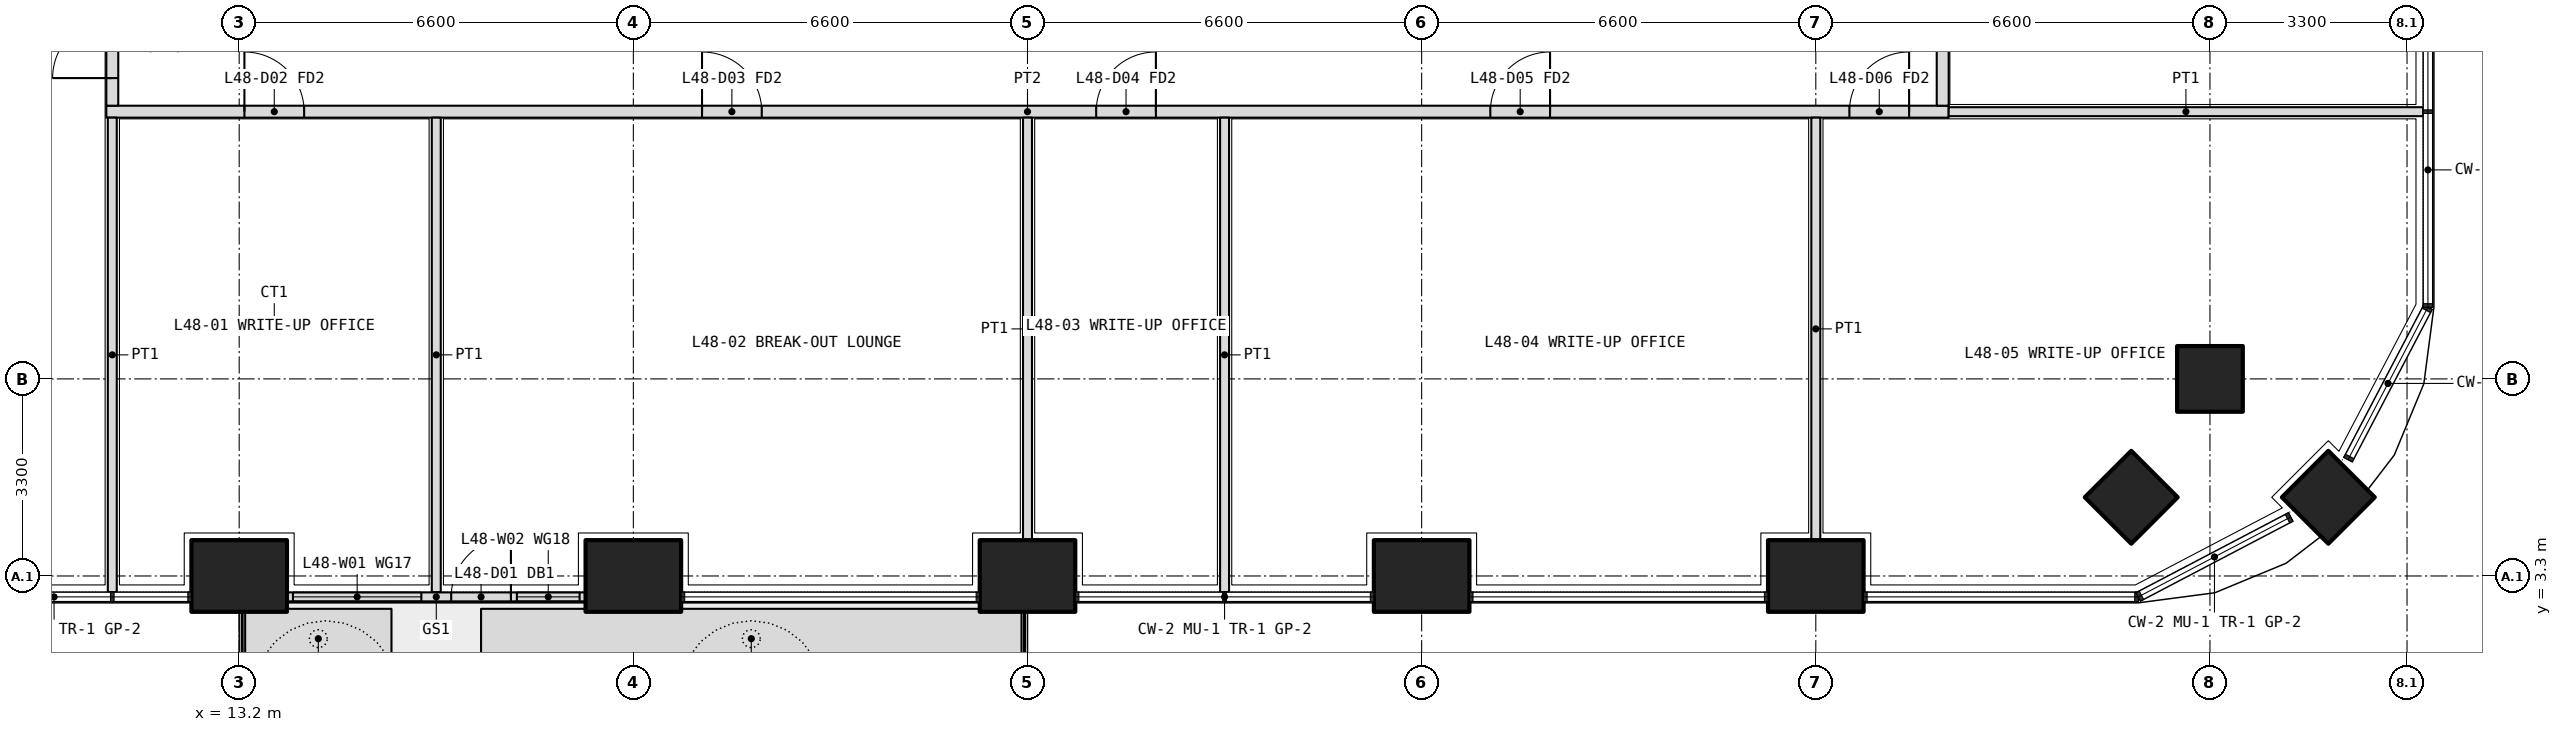
"""IFC4 building model, lengths in metres.
Left out: names, types, materials, properties, quantities, classifications, styles, units other than length and angle.
Written with IfcOpenShell. Run it as: python <this file> out.ifc"""

import sys

from ifc_helpers import new_model, si_unit, direction, frame, frame_2d, origin, origin_2d, place, context, subcontext, project, spatial, polyline, rectangle, outline, extrude, element, fill, save


model = new_model("IFC4")
c1 = context("Model", 3, precision=1e-05, world=origin(), true_north=direction((0.0, 1.0)))
c2 = subcontext(c1, "Body", "Model", "MODEL_VIEW")
j1 = project(units=[si_unit("LENGTHUNIT", "METRE"), si_unit("PLANEANGLEUNIT", "RADIAN")], contexts=[c1])
p1 = place(None, origin())
s1 = spatial("IfcSite", under=j1, at=p1, CompositionType="ELEMENT")
p2 = place(p1, origin())
s2 = spatial("IfcBuilding", under=s1, at=p2, CompositionType="ELEMENT")
p3 = place(p2, frame((0.0, 0.0, 210.3)))
s3 = spatial("IfcBuildingStorey", under=s2, at=p3, CompositionType="ELEMENT", Elevation=210.3)
p4 = place(p3, frame((48.182, 4.618, 0.0), z_axis=(0.0, 0.0, 1.0), x_axis=(0.707106781187, 0.707106781187, 0.0)))
e1 = element("IfcColumn", 1, at=p4, inside=s3, PredefinedType="COLUMN", context=c2, shape_type="SweptSolid", body=[
    extrude(rectangle(XDim=1.1, YDim=1.1, at=origin_2d()), origin(), (0.0, 0.0, 1.0), 4.2),
])
for number, where, z_axis, x_axis in (
    (2, (13.2, 3.3, 0.0), (0.0, 0.0, 1.0), (1.0, 0.0, 0.0)),
    (3, (19.8, 3.3, 0.0), (0.0, 0.0, 1.0), (1.0, 0.0, 0.0)),
    (4, (26.4, 3.3, 0.0), (0.0, 0.0, 1.0), (1.0, 0.0, 0.0)),
    (5, (33.0, 3.3, 0.0), (0.0, 0.0, 1.0), (1.0, 0.0, 0.0)),
    (6, (39.6, 3.3, 0.0), (0.0, 0.0, 1.0), (1.0, 0.0, 0.0)),
):
    element("IfcColumn", number, at=place(p3, frame(where, z_axis=z_axis, x_axis=x_axis)), inside=s3, PredefinedType="COLUMN", context=c2, shape_type="SweptSolid", body=[
        extrude(rectangle(XDim=1.6, YDim=1.2, at=origin_2d()), origin(), (0.0, 0.0, 1.0), 4.2),
    ])
for number, where, z_axis, x_axis in (
    (7, (46.2, 6.6, 0.0), (0.0, 0.0, 1.0), (1.0, 0.0, 0.0)),
    (8, (44.882, 4.618, 0.0), (0.0, 0.0, 1.0), (0.707, 0.707, 0.0)),
):
    element("IfcColumn", number, at=place(p3, frame(where, z_axis=z_axis, x_axis=x_axis)), inside=s3, PredefinedType="COLUMN", context=c2, shape_type="SweptSolid", body=[
        extrude(rectangle(XDim=1.1, YDim=1.1, at=origin_2d()), origin(), (0.0, 0.0, 1.0), 4.2),
    ])
p5 = place(p3, origin())
e9 = element("IfcWall", 9, at=p5, inside=s3, PredefinedType="USERDEFINED", context=c2, shape_type="SweptSolid", body=[
    extrude(outline(polyline([(13.3, 1.75), (15.75, 1.75), (15.75, 2.75), (13.3, 2.75), (13.3, 1.75)]), holes=[polyline([(13.45, 1.9), (15.6, 1.9), (15.6, 2.6), (13.45, 2.6), (13.45, 1.9)])]), origin(), (0.0, 0.0, 1.0), 1.05),
])
p6 = place(p3, origin())
e10 = element("IfcWall", 10, at=p6, inside=s3, PredefinedType="USERDEFINED", context=c2, shape_type="SweptSolid", body=[
    extrude(outline(polyline([(17.25, 1.75), (26.3, 1.75), (26.3, 2.75), (17.25, 2.75), (17.25, 1.75)]), holes=[polyline([(17.4, 1.9), (26.15, 1.9), (26.15, 2.6), (17.4, 2.6), (17.4, 1.9)])]), origin(), (0.0, 0.0, 1.0), 1.05),
])
p7 = place(p3, frame((14.0, 2.95, 0.0), z_axis=(0.0, 0.0, 1.0), x_axis=(1.0, 0.0, 0.0)))
e11 = element("IfcWall", 11, at=p7, inside=s3, PredefinedType="SOLIDWALL", context=c2, shape_type="SweptSolid", body=[
    extrude(rectangle(XDim=5.0, YDim=0.15, at=frame_2d((2.5, 0.0))), origin(), (0.0, 0.0, 1.0), 2.6),
])
p8 = place(p7, frame((2.75, 0.0, 0.0)))
e12 = element("IfcOpeningElement", 12, at=p8, cuts=e11, PredefinedType="OPENING", context=c2, shape_type="SweptSolid", body=[
    extrude(rectangle(XDim=1.0, YDim=2.4, at=frame_2d((0.5, 1.2))), frame((0.0, 0.085, 0.0), z_axis=(0.0, -1.0, 0.0), x_axis=(1.0, 0.0, 0.0)), (0.0, 0.0, 1.0), 0.17),
])
p9 = place(p7, frame((0.1, 0.0, 0.1)))
e13 = element("IfcOpeningElement", 13, at=p9, cuts=e11, PredefinedType="OPENING", context=c2, shape_type="SweptSolid", body=[
    extrude(rectangle(XDim=2.15, YDim=2.2, at=frame_2d((1.075, 1.1))), frame((0.0, 0.085, 0.0), z_axis=(0.0, -1.0, 0.0), x_axis=(1.0, 0.0, 0.0)), (0.0, 0.0, 1.0), 0.17),
])
p10 = place(p7, frame((3.85, 0.0, 0.1)))
e14 = element("IfcOpeningElement", 14, at=p10, cuts=e11, PredefinedType="OPENING", context=c2, shape_type="SweptSolid", body=[
    extrude(rectangle(XDim=1.05, YDim=2.2, at=frame_2d((0.525, 1.1))), frame((0.0, 0.085, 0.0), z_axis=(0.0, -1.0, 0.0), x_axis=(1.0, 0.0, 0.0)), (0.0, 0.0, 1.0), 0.17),
])
p11 = place(p3, frame((10.975, 11.075, 0.0), z_axis=(0.0, 0.0, 1.0), x_axis=(1.0, 0.0, 0.0)))
e15 = element("IfcWall", 15, at=p11, inside=s3, PredefinedType="PARTITIONING", context=c2, shape_type="SweptSolid", body=[
    extrude(rectangle(XDim=30.85, YDim=0.2, at=frame_2d((15.425, 0.0))), origin(), (0.0, 0.0, 1.0), 2.85),
])
p12 = place(p11, frame((2.312, 0.0, 0.0)))
e16 = element("IfcOpeningElement", 16, at=p12, cuts=e15, PredefinedType="OPENING", context=c2, shape_type="SweptSolid", body=[
    extrude(rectangle(XDim=1.0, YDim=2.1, at=frame_2d((0.5, 1.05))), frame((0.0, 0.11, 0.0), z_axis=(0.0, -1.0, 0.0), x_axis=(1.0, 0.0, 0.0)), (0.0, 0.0, 1.0), 0.22),
])
p13 = place(p11, frame((9.975, 0.0, 0.0)))
e17 = element("IfcOpeningElement", 17, at=p13, cuts=e15, PredefinedType="OPENING", context=c2, shape_type="SweptSolid", body=[
    extrude(rectangle(XDim=1.0, YDim=2.1, at=frame_2d((0.5, 1.05))), frame((0.0, 0.11, 0.0), z_axis=(0.0, -1.0, 0.0), x_axis=(1.0, 0.0, 0.0)), (0.0, 0.0, 1.0), 0.22),
])
p14 = place(p11, frame((16.575, 0.0, 0.0)))
e18 = element("IfcOpeningElement", 18, at=p14, cuts=e15, PredefinedType="OPENING", context=c2, shape_type="SweptSolid", body=[
    extrude(rectangle(XDim=1.0, YDim=2.1, at=frame_2d((0.5, 1.05))), frame((0.0, 0.11, 0.0), z_axis=(0.0, -1.0, 0.0), x_axis=(1.0, 0.0, 0.0)), (0.0, 0.0, 1.0), 0.22),
])
p15 = place(p11, frame((23.175, 0.0, 0.0)))
e19 = element("IfcOpeningElement", 19, at=p15, cuts=e15, PredefinedType="OPENING", context=c2, shape_type="SweptSolid", body=[
    extrude(rectangle(XDim=1.0, YDim=2.1, at=frame_2d((0.5, 1.05))), frame((0.0, 0.11, 0.0), z_axis=(0.0, -1.0, 0.0), x_axis=(1.0, 0.0, 0.0)), (0.0, 0.0, 1.0), 0.22),
])
p16 = place(p11, frame((29.188, 0.0, 0.0)))
e20 = element("IfcOpeningElement", 20, at=p16, cuts=e15, PredefinedType="OPENING", context=c2, shape_type="SweptSolid", body=[
    extrude(rectangle(XDim=1.0, YDim=2.1, at=frame_2d((0.5, 1.05))), frame((0.0, 0.11, 0.0), z_axis=(0.0, -1.0, 0.0), x_axis=(1.0, 0.0, 0.0)), (0.0, 0.0, 1.0), 0.22),
])
p17 = place(p3, frame((11.075, 11.175, 0.0), z_axis=(0.0, 0.0, 1.0), x_axis=(0.0, 1.0, 0.0)))
e21 = element("IfcWall", 21, at=p17, inside=s3, PredefinedType="PARTITIONING", context=c2, shape_type="SweptSolid", body=[
    extrude(rectangle(XDim=23.85, YDim=0.2, at=frame_2d((11.925, 0.0))), origin(), (0.0, 0.0, 1.0), 2.85),
])
p18 = place(p17, frame((0.462, 0.0, 0.0)))
e22 = element("IfcOpeningElement", 22, at=p18, cuts=e21, PredefinedType="OPENING", context=c2, shape_type="SweptSolid", body=[
    extrude(rectangle(XDim=1.0, YDim=2.1, at=frame_2d((0.5, 1.05))), frame((0.0, 0.11, 0.0), z_axis=(0.0, -1.0, 0.0), x_axis=(1.0, 0.0, 0.0)), (0.0, 0.0, 1.0), 0.22),
])
p19 = place(p17, frame((3.125, 0.0, 0.0)))
e23 = element("IfcOpeningElement", 23, at=p19, cuts=e21, PredefinedType="OPENING", context=c2, shape_type="SweptSolid", body=[
    extrude(rectangle(XDim=1.0, YDim=2.1, at=frame_2d((0.5, 1.05))), frame((0.0, 0.11, 0.0), z_axis=(0.0, -1.0, 0.0), x_axis=(1.0, 0.0, 0.0)), (0.0, 0.0, 1.0), 0.22),
])
p20 = place(p17, frame((6.475, 0.0, 0.0)))
e24 = element("IfcOpeningElement", 24, at=p20, cuts=e21, PredefinedType="OPENING", context=c2, shape_type="SweptSolid", body=[
    extrude(rectangle(XDim=0.9, YDim=2.1, at=frame_2d((0.45, 1.05))), frame((0.0, 0.11, 0.0), z_axis=(0.0, -1.0, 0.0), x_axis=(1.0, 0.0, 0.0)), (0.0, 0.0, 1.0), 0.22),
])
p21 = place(p17, frame((9.675, 0.0, 0.0)))
e25 = element("IfcOpeningElement", 25, at=p21, cuts=e21, PredefinedType="OPENING", context=c2, shape_type="SweptSolid", body=[
    extrude(rectangle(XDim=0.9, YDim=2.1, at=frame_2d((0.45, 1.05))), frame((0.0, 0.11, 0.0), z_axis=(0.0, -1.0, 0.0), x_axis=(1.0, 0.0, 0.0)), (0.0, 0.0, 1.0), 0.22),
])
p22 = place(p17, frame((12.925, 0.0, 0.0)))
e26 = element("IfcOpeningElement", 26, at=p22, cuts=e21, PredefinedType="OPENING", context=c2, shape_type="SweptSolid", body=[
    extrude(rectangle(XDim=1.0, YDim=2.1, at=frame_2d((0.5, 1.05))), frame((0.0, 0.11, 0.0), z_axis=(0.0, -1.0, 0.0), x_axis=(1.0, 0.0, 0.0)), (0.0, 0.0, 1.0), 0.22),
])
p23 = place(p17, frame((16.275, 0.0, 0.0)))
e27 = element("IfcOpeningElement", 27, at=p23, cuts=e21, PredefinedType="OPENING", context=c2, shape_type="SweptSolid", body=[
    extrude(rectangle(XDim=1.2, YDim=2.1, at=frame_2d((0.6, 1.05))), frame((0.0, 0.11, 0.0), z_axis=(0.0, -1.0, 0.0), x_axis=(1.0, 0.0, 0.0)), (0.0, 0.0, 1.0), 0.22),
])
p24 = place(p17, frame((19.575, 0.0, 0.0)))
e28 = element("IfcOpeningElement", 28, at=p24, cuts=e21, PredefinedType="OPENING", context=c2, shape_type="SweptSolid", body=[
    extrude(rectangle(XDim=1.2, YDim=2.1, at=frame_2d((0.6, 1.05))), frame((0.0, 0.11, 0.0), z_axis=(0.0, -1.0, 0.0), x_axis=(1.0, 0.0, 0.0)), (0.0, 0.0, 1.0), 0.22),
])
p25 = place(p17, frame((22.288, 0.0, 0.0)))
e29 = element("IfcOpeningElement", 29, at=p25, cuts=e21, PredefinedType="OPENING", context=c2, shape_type="SweptSolid", body=[
    extrude(rectangle(XDim=1.2, YDim=2.1, at=frame_2d((0.6, 1.05))), frame((0.0, 0.11, 0.0), z_axis=(0.0, -1.0, 0.0), x_axis=(1.0, 0.0, 0.0)), (0.0, 0.0, 1.0), 0.22),
])
p26 = place(p3, frame((41.725, 11.175, 0.0), z_axis=(0.0, 0.0, 1.0), x_axis=(0.0, 1.0, 0.0)))
e30 = element("IfcWall", 30, at=p26, inside=s3, PredefinedType="PARTITIONING", context=c2, shape_type="SweptSolid", body=[
    extrude(rectangle(XDim=23.85, YDim=0.2, at=frame_2d((11.925, 0.0))), origin(), (0.0, 0.0, 1.0), 2.85),
])
p27 = place(p26, frame((3.762, 0.0, 0.0)))
e31 = element("IfcOpeningElement", 31, at=p27, cuts=e30, PredefinedType="OPENING", context=c2, shape_type="SweptSolid", body=[
    extrude(rectangle(XDim=1.0, YDim=2.1, at=frame_2d((0.5, 1.05))), frame((0.0, 0.11, 0.0), z_axis=(0.0, -1.0, 0.0), x_axis=(1.0, 0.0, 0.0)), (0.0, 0.0, 1.0), 0.22),
])
p28 = place(p26, frame((9.625, 0.0, 0.0)))
e32 = element("IfcOpeningElement", 32, at=p28, cuts=e30, PredefinedType="OPENING", context=c2, shape_type="SweptSolid", body=[
    extrude(rectangle(XDim=1.0, YDim=2.1, at=frame_2d((0.5, 1.05))), frame((0.0, 0.11, 0.0), z_axis=(0.0, -1.0, 0.0), x_axis=(1.0, 0.0, 0.0)), (0.0, 0.0, 1.0), 0.22),
])
p29 = place(p26, frame((12.975, 0.0, 0.0)))
e33 = element("IfcOpeningElement", 33, at=p29, cuts=e30, PredefinedType="OPENING", context=c2, shape_type="SweptSolid", body=[
    extrude(rectangle(XDim=0.9, YDim=2.1, at=frame_2d((0.45, 1.05))), frame((0.0, 0.11, 0.0), z_axis=(0.0, -1.0, 0.0), x_axis=(1.0, 0.0, 0.0)), (0.0, 0.0, 1.0), 0.22),
])
p30 = place(p26, frame((17.925, 0.0, 0.0)))
e34 = element("IfcOpeningElement", 34, at=p30, cuts=e30, PredefinedType="OPENING", context=c2, shape_type="SweptSolid", body=[
    extrude(rectangle(XDim=1.2, YDim=2.1, at=frame_2d((0.6, 1.05))), frame((0.0, 0.11, 0.0), z_axis=(0.0, -1.0, 0.0), x_axis=(1.0, 0.0, 0.0)), (0.0, 0.0, 1.0), 0.22),
])
p31 = place(p26, frame((22.387, 0.0, 0.0)))
e35 = element("IfcOpeningElement", 35, at=p31, cuts=e30, PredefinedType="OPENING", context=c2, shape_type="SweptSolid", body=[
    extrude(rectangle(XDim=1.0, YDim=2.1, at=frame_2d((0.5, 1.05))), frame((0.0, 0.11, 0.0), z_axis=(0.0, -1.0, 0.0), x_axis=(1.0, 0.0, 0.0)), (0.0, 0.0, 1.0), 0.22),
])
for number, where, z_axis, x_axis in (
    (36, (11.075, 3.03, 0.0), (0.0, 0.0, 1.0), (0.0, 1.0, 0.0)),
    (37, (49.77, 11.075, 0.0), (0.0, 0.0, 1.0), (-1.0, 0.0, 0.0)),
    (38, (16.5, 3.03, 0.0), (0.0, 0.0, 1.0), (0.0, 1.0, 0.0)),
):
    element("IfcWall", number, at=place(p3, frame(where, z_axis=z_axis, x_axis=x_axis)), inside=s3, PredefinedType="PARTITIONING", context=c2, shape_type="SweptSolid", body=[
        extrude(rectangle(XDim=7.945, YDim=0.15, at=frame_2d((3.973, 0.0))), origin(), (0.0, 0.0, 1.0), 2.6),
    ])
p32 = place(p3, frame((26.4, 3.9, 0.0), z_axis=(0.0, 0.0, 1.0), x_axis=(0.0, 1.0, 0.0)))
e39 = element("IfcWall", 39, at=p32, inside=s3, PredefinedType="PARTITIONING", context=c2, shape_type="SweptSolid", body=[
    extrude(rectangle(XDim=7.075, YDim=0.15, at=frame_2d((3.538, 0.0))), origin(), (0.0, 0.0, 1.0), 2.85),
])
p33 = place(p3, frame((29.7, 3.03, 0.0), z_axis=(0.0, 0.0, 1.0), x_axis=(0.0, 1.0, 0.0)))
e40 = element("IfcWall", 40, at=p33, inside=s3, PredefinedType="PARTITIONING", context=c2, shape_type="SweptSolid", body=[
    extrude(rectangle(XDim=7.945, YDim=0.15, at=frame_2d((3.973, 0.0))), origin(), (0.0, 0.0, 1.0), 2.6),
])
p34 = place(p3, frame((39.6, 3.9, 0.0), z_axis=(0.0, 0.0, 1.0), x_axis=(0.0, 1.0, 0.0)))
e41 = element("IfcWall", 41, at=p34, inside=s3, PredefinedType="PARTITIONING", context=c2, shape_type="SweptSolid", body=[
    extrude(rectangle(XDim=7.075, YDim=0.15, at=frame_2d((3.538, 0.0))), origin(), (0.0, 0.0, 1.0), 2.85),
])
p35 = place(p8, origin())
e42 = element("IfcDoor", 42, at=p35, inside=s3, OperationType="SINGLE_SWING_RIGHT", PredefinedType="DOOR", context=c2, shape_type="SweptSolid", body=[
    extrude(rectangle(XDim=1.0, YDim=2.4, at=frame_2d((0.5, 1.2))), frame((0.0, 0.025, 0.0), z_axis=(0.0, -1.0, 0.0), x_axis=(1.0, 0.0, 0.0)), (0.0, 0.0, 1.0), 0.05),
])
fill(e12, e42)
p36 = place(p9, origin())
e43 = element("IfcWindow", 43, at=p36, inside=s3, PartitioningType="SINGLE_PANEL", PredefinedType="WINDOW", context=c2, shape_type="SweptSolid", body=[
    extrude(rectangle(XDim=2.15, YDim=2.2, at=frame_2d((1.075, 1.1))), frame((0.0, 0.03, 0.0), z_axis=(0.0, -1.0, 0.0), x_axis=(1.0, 0.0, 0.0)), (0.0, 0.0, 1.0), 0.06),
])
fill(e13, e43)
p37 = place(p10, origin())
e44 = element("IfcWindow", 44, at=p37, inside=s3, PartitioningType="SINGLE_PANEL", PredefinedType="WINDOW", context=c2, shape_type="SweptSolid", body=[
    extrude(rectangle(XDim=1.05, YDim=2.2, at=frame_2d((0.525, 1.1))), frame((0.0, 0.03, 0.0), z_axis=(0.0, -1.0, 0.0), x_axis=(1.0, 0.0, 0.0)), (0.0, 0.0, 1.0), 0.06),
])
fill(e14, e44)
p38 = place(p12, origin())
e45 = element("IfcDoor", 45, at=p38, inside=s3, OperationType="SINGLE_SWING_LEFT", PredefinedType="DOOR", context=c2, shape_type="SweptSolid", body=[
    extrude(rectangle(XDim=1.0, YDim=2.1, at=frame_2d((0.5, 1.05))), frame((0.0, 0.025, 0.0), z_axis=(0.0, -1.0, 0.0), x_axis=(1.0, 0.0, 0.0)), (0.0, 0.0, 1.0), 0.05),
])
fill(e16, e45)
p39 = place(p13, origin())
e46 = element("IfcDoor", 46, at=p39, inside=s3, OperationType="SINGLE_SWING_LEFT", PredefinedType="DOOR", context=c2, shape_type="SweptSolid", body=[
    extrude(rectangle(XDim=1.0, YDim=2.1, at=frame_2d((0.5, 1.05))), frame((0.0, 0.025, 0.0), z_axis=(0.0, -1.0, 0.0), x_axis=(1.0, 0.0, 0.0)), (0.0, 0.0, 1.0), 0.05),
])
fill(e17, e46)
p40 = place(p14, origin())
e47 = element("IfcDoor", 47, at=p40, inside=s3, OperationType="SINGLE_SWING_RIGHT", PredefinedType="DOOR", context=c2, shape_type="SweptSolid", body=[
    extrude(rectangle(XDim=1.0, YDim=2.1, at=frame_2d((0.5, 1.05))), frame((0.0, 0.025, 0.0), z_axis=(0.0, -1.0, 0.0), x_axis=(1.0, 0.0, 0.0)), (0.0, 0.0, 1.0), 0.05),
])
fill(e18, e47)
p41 = place(p15, origin())
e48 = element("IfcDoor", 48, at=p41, inside=s3, OperationType="SINGLE_SWING_RIGHT", PredefinedType="DOOR", context=c2, shape_type="SweptSolid", body=[
    extrude(rectangle(XDim=1.0, YDim=2.1, at=frame_2d((0.5, 1.05))), frame((0.0, 0.025, 0.0), z_axis=(0.0, -1.0, 0.0), x_axis=(1.0, 0.0, 0.0)), (0.0, 0.0, 1.0), 0.05),
])
fill(e19, e48)
p42 = place(p16, origin())
e49 = element("IfcDoor", 49, at=p42, inside=s3, OperationType="SINGLE_SWING_RIGHT", PredefinedType="DOOR", context=c2, shape_type="SweptSolid", body=[
    extrude(rectangle(XDim=1.0, YDim=2.1, at=frame_2d((0.5, 1.05))), frame((0.0, 0.025, 0.0), z_axis=(0.0, -1.0, 0.0), x_axis=(1.0, 0.0, 0.0)), (0.0, 0.0, 1.0), 0.05),
])
fill(e20, e49)
p43 = place(p18, origin())
e50 = element("IfcDoor", 50, at=p43, inside=s3, OperationType="SINGLE_SWING_LEFT", PredefinedType="DOOR", context=c2, shape_type="SweptSolid", body=[
    extrude(rectangle(XDim=1.0, YDim=2.1, at=frame_2d((0.5, 1.05))), frame((0.0, 0.025, 0.0), z_axis=(0.0, -1.0, 0.0), x_axis=(1.0, 0.0, 0.0)), (0.0, 0.0, 1.0), 0.05),
])
fill(e22, e50)
save(model, sys.argv[1])
